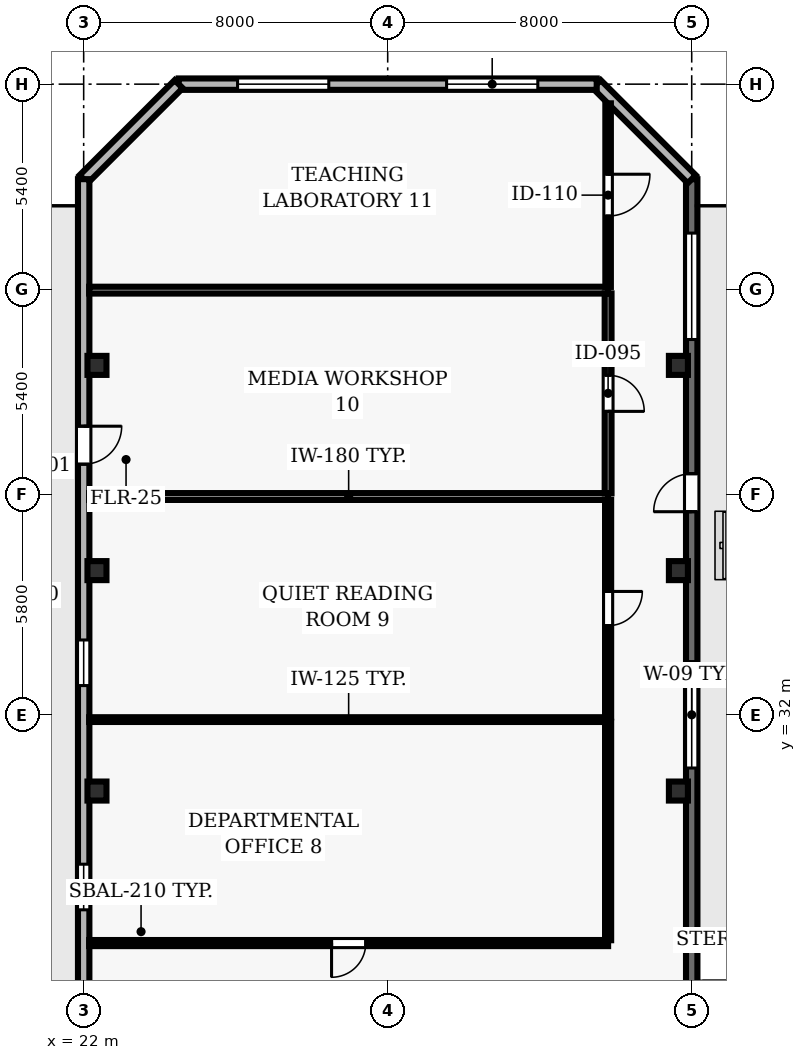
"""IFC4 building model, lengths in metres.
Left out: names, types, materials, properties, quantities, classifications, styles, units other than length and angle.
Written with IfcOpenShell. Run it as: python <this file> out.ifc"""

import sys

from ifc_helpers import new_model, si_unit, direction, frame, frame_2d, origin, origin_2d, place, context, subcontext, project, spatial, rectangle, hollow_rectangle, extrude, element, fill, save


model = new_model("IFC4")
c1 = context("Model", 3, precision=1e-05, world=origin(), true_north=direction((0.0, 1.0)))
c2 = subcontext(c1, "Body", "Model", "MODEL_VIEW")
j1 = project(units=[si_unit("LENGTHUNIT", "METRE"), si_unit("PLANEANGLEUNIT", "RADIAN")], contexts=[c1])
p1 = place(None, origin())
s1 = spatial("IfcSite", under=j1, at=p1, CompositionType="ELEMENT")
p2 = place(p1, origin())
s2 = spatial("IfcBuilding", under=s1, at=p2, CompositionType="ELEMENT")
p3 = place(p2, frame((0.0, 0.0, 150.2)))
s3 = spatial("IfcBuildingStorey", under=s2, at=p3, CompositionType="ELEMENT", Elevation=150.2)
for number, where, z_axis, x_axis in (
    (1, (22.35, 30.0, 0.0), (0.0, 0.0, 1.0), (1.0, 0.0, 0.0)),
    (2, (37.65, 30.0, 0.0), (0.0, 0.0, 1.0), (1.0, 0.0, 0.0)),
    (3, (22.35, 35.8, 0.0), (0.0, 0.0, 1.0), (1.0, 0.0, 0.0)),
    (4, (37.65, 35.8, 0.0), (0.0, 0.0, 1.0), (1.0, 0.0, 0.0)),
    (5, (22.35, 41.2, 0.0), (0.0, 0.0, 1.0), (1.0, 0.0, 0.0)),
    (6, (37.65, 41.2, 0.0), (0.0, 0.0, 1.0), (1.0, 0.0, 0.0)),
):
    element("IfcColumn", number, at=place(p3, frame(where, z_axis=z_axis, x_axis=x_axis)), inside=s3, PredefinedType="COLUMN", context=c2, shape_type="SweptSolid", body=[
        extrude(hollow_rectangle(XDim=0.5, YDim=0.5, WallThickness=0.025, at=origin_2d()), origin(), (0.0, 0.0, 1.0), 3.9),
    ])
p4 = place(p3, frame((38.0, 23.55, 0.0), z_axis=(0.0, 0.0, 1.0), x_axis=(0.0, 1.0, 0.0)))
e7 = element("IfcWall", 7, at=p4, inside=s3, PredefinedType="SOLIDWALL", context=c2, shape_type="SweptSolid", body=[
    extrude(rectangle(XDim=22.55, YDim=0.3, at=frame_2d((11.275, 0.0))), origin(), (0.0, 0.0, 1.0), 3.69),
])
p5 = place(p4, frame((13.8, 0.0, 0.0)))
e8 = element("IfcOpeningElement", 8, at=p5, cuts=e7, PredefinedType="OPENING", context=c2, shape_type="SweptSolid", body=[
    extrude(rectangle(XDim=1.0, YDim=2.2, at=frame_2d((0.5, 1.1))), frame((0.0, 0.16, 0.0), z_axis=(0.0, -1.0, 0.0), x_axis=(1.0, 0.0, 0.0)), (0.0, 0.0, 1.0), 0.32),
])
p6 = place(p4, frame((7.056, 0.0, 0.9)))
e9 = element("IfcOpeningElement", 9, at=p6, cuts=e7, PredefinedType="OPENING", context=c2, shape_type="SweptSolid", body=[
    extrude(rectangle(XDim=2.8, YDim=1.8, at=frame_2d((1.4, 0.9))), frame((0.0, 0.16, 0.0), z_axis=(0.0, -1.0, 0.0), x_axis=(1.0, 0.0, 0.0)), (0.0, 0.0, 1.0), 0.32),
])
p7 = place(p4, frame((18.331, 0.0, 0.9)))
e10 = element("IfcOpeningElement", 10, at=p7, cuts=e7, PredefinedType="OPENING", context=c2, shape_type="SweptSolid", body=[
    extrude(rectangle(XDim=2.8, YDim=1.8, at=frame_2d((1.4, 0.9))), frame((0.0, 0.16, 0.0), z_axis=(0.0, -1.0, 0.0), x_axis=(1.0, 0.0, 0.0)), (0.0, 0.0, 1.0), 0.32),
])
p8 = place(p3, frame((38.0, 46.1, 0.0), z_axis=(0.0, 0.0, 1.0), x_axis=(-0.707106781187, 0.707106781187, 0.0)))
e11 = element("IfcWall", 11, at=p8, inside=s3, PredefinedType="SOLIDWALL", context=c2, shape_type="SweptSolid", body=[
    extrude(rectangle(XDim=3.536, YDim=0.3, at=frame_2d((1.768, 0.0))), origin(), (0.0, 0.0, 1.0), 3.69),
])
p9 = place(p3, frame((35.5, 48.6, 0.0), z_axis=(0.0, 0.0, 1.0), x_axis=(-1.0, 0.0, 0.0)))
e12 = element("IfcWall", 12, at=p9, inside=s3, PredefinedType="SOLIDWALL", context=c2, shape_type="SweptSolid", body=[
    extrude(rectangle(XDim=11.0, YDim=0.3, at=frame_2d((5.5, 0.0))), origin(), (0.0, 0.0, 1.0), 3.69),
])
p10 = place(p9, frame((1.55, 0.0, 0.9)))
e13 = element("IfcOpeningElement", 13, at=p10, cuts=e12, PredefinedType="OPENING", context=c2, shape_type="SweptSolid", body=[
    extrude(rectangle(XDim=2.4, YDim=2.2, at=frame_2d((1.2, 1.1))), frame((0.0, 0.16, 0.0), z_axis=(0.0, -1.0, 0.0), x_axis=(1.0, 0.0, 0.0)), (0.0, 0.0, 1.0), 0.32),
])
p11 = place(p9, frame((7.05, 0.0, 0.9)))
e14 = element("IfcOpeningElement", 14, at=p11, cuts=e12, PredefinedType="OPENING", context=c2, shape_type="SweptSolid", body=[
    extrude(rectangle(XDim=2.4, YDim=2.2, at=frame_2d((1.2, 1.1))), frame((0.0, 0.16, 0.0), z_axis=(0.0, -1.0, 0.0), x_axis=(1.0, 0.0, 0.0)), (0.0, 0.0, 1.0), 0.32),
])
p12 = place(p3, frame((24.5, 48.6, 0.0), z_axis=(0.0, 0.0, 1.0), x_axis=(-0.707106781187, -0.707106781187, 0.0)))
e15 = element("IfcWall", 15, at=p12, inside=s3, PredefinedType="SOLIDWALL", context=c2, shape_type="SweptSolid", body=[
    extrude(rectangle(XDim=3.536, YDim=0.3, at=frame_2d((1.768, 0.0))), origin(), (0.0, 0.0, 1.0), 3.69),
])
p13 = place(p3, frame((22.0, 46.1, 0.0), z_axis=(0.0, 0.0, 1.0), x_axis=(0.0, -1.0, 0.0)))
e16 = element("IfcWall", 16, at=p13, inside=s3, PredefinedType="SOLIDWALL", context=c2, shape_type="SweptSolid", body=[
    extrude(rectangle(XDim=43.6, YDim=0.3, at=frame_2d((21.8, 0.0))), origin(), (0.0, 0.0, 1.0), 3.69),
])
p14 = place(p13, frame((6.5, 0.0, 0.0)))
e17 = element("IfcOpeningElement", 17, at=p14, cuts=e16, PredefinedType="OPENING", context=c2, shape_type="SweptSolid", body=[
    extrude(rectangle(XDim=1.0, YDim=2.2, at=frame_2d((0.5, 1.1))), frame((0.0, 0.16, 0.0), z_axis=(0.0, -1.0, 0.0), x_axis=(1.0, 0.0, 0.0)), (0.0, 0.0, 1.0), 0.32),
])
p15 = place(p13, frame((12.125, 0.0, 0.9)))
e18 = element("IfcOpeningElement", 18, at=p15, cuts=e16, PredefinedType="OPENING", context=c2, shape_type="SweptSolid", body=[
    extrude(rectangle(XDim=1.2, YDim=1.6, at=frame_2d((0.6, 0.8))), frame((0.0, 0.16, 0.0), z_axis=(0.0, -1.0, 0.0), x_axis=(1.0, 0.0, 0.0)), (0.0, 0.0, 1.0), 0.32),
])
p16 = place(p13, frame((18.025, 0.0, 0.9)))
e19 = element("IfcOpeningElement", 19, at=p16, cuts=e16, PredefinedType="OPENING", context=c2, shape_type="SweptSolid", body=[
    extrude(rectangle(XDim=1.2, YDim=1.6, at=frame_2d((0.6, 0.8))), frame((0.0, 0.16, 0.0), z_axis=(0.0, -1.0, 0.0), x_axis=(1.0, 0.0, 0.0)), (0.0, 0.0, 1.0), 0.32),
])
p17 = place(p13, frame((23.925, 0.0, 0.9)))
e20 = element("IfcOpeningElement", 20, at=p17, cuts=e16, PredefinedType="OPENING", context=c2, shape_type="SweptSolid", body=[
    extrude(rectangle(XDim=1.2, YDim=1.6, at=frame_2d((0.6, 0.8))), frame((0.0, 0.16, 0.0), z_axis=(0.0, -1.0, 0.0), x_axis=(1.0, 0.0, 0.0)), (0.0, 0.0, 1.0), 0.32),
])
p18 = place(p13, frame((29.375, 0.0, 0.9)))
e21 = element("IfcOpeningElement", 21, at=p18, cuts=e16, PredefinedType="OPENING", context=c2, shape_type="SweptSolid", body=[
    extrude(rectangle(XDim=1.2, YDim=1.6, at=frame_2d((0.6, 0.8))), frame((0.0, 0.16, 0.0), z_axis=(0.0, -1.0, 0.0), x_axis=(1.0, 0.0, 0.0)), (0.0, 0.0, 1.0), 0.32),
])
p19 = place(p13, frame((34.825, 0.0, 0.9)))
e22 = element("IfcOpeningElement", 22, at=p19, cuts=e16, PredefinedType="OPENING", context=c2, shape_type="SweptSolid", body=[
    extrude(rectangle(XDim=1.2, YDim=1.6, at=frame_2d((0.6, 0.8))), frame((0.0, 0.16, 0.0), z_axis=(0.0, -1.0, 0.0), x_axis=(1.0, 0.0, 0.0)), (0.0, 0.0, 1.0), 0.32),
])
p20 = place(p3, frame((35.8, 26.0, 0.0), z_axis=(0.0, 0.0, 1.0), x_axis=(-1.0, 0.0, 0.0)))
e23 = element("IfcWall", 23, at=p20, inside=s3, PredefinedType="PARTITIONING", context=c2, shape_type="SweptSolid", body=[
    extrude(rectangle(XDim=13.655, YDim=0.16, at=frame_2d((6.828, 0.0))), origin(), (0.0, 0.0, 1.0), 3.69),
])
p21 = place(p20, frame((6.377, 0.0, 0.0)))
e24 = element("IfcOpeningElement", 24, at=p21, cuts=e23, PredefinedType="OPENING", context=c2, shape_type="SweptSolid", body=[
    extrude(rectangle(XDim=0.9, YDim=2.1, at=frame_2d((0.45, 1.05))), frame((0.0, 0.09, 0.0), z_axis=(0.0, -1.0, 0.0), x_axis=(1.0, 0.0, 0.0)), (0.0, 0.0, 1.0), 0.18),
])
p22 = place(p3, frame((35.8, 31.88, 0.0), z_axis=(0.0, 0.0, 1.0), x_axis=(-1.0, 0.0, 0.0)))
e25 = element("IfcWall", 25, at=p22, inside=s3, PredefinedType="PARTITIONING", context=c2, shape_type="SweptSolid", body=[
    extrude(rectangle(XDim=13.655, YDim=0.125, at=frame_2d((6.828, 0.0))), origin(), (0.0, 0.0, 1.0), 3.69),
])
for number, where, z_axis, x_axis in (
    (26, (35.8, 37.75, 0.0), (0.0, 0.0, 1.0), (-1.0, 0.0, 0.0)),
    (27, (35.8, 43.18, 0.0), (0.0, 0.0, 1.0), (-1.0, 0.0, 0.0)),
):
    element("IfcWall", number, at=place(p3, frame(where, z_axis=z_axis, x_axis=x_axis)), inside=s3, PredefinedType="PARTITIONING", context=c2, shape_type="SweptSolid", body=[
        extrude(rectangle(XDim=13.655, YDim=0.18, at=frame_2d((6.828, 0.0))), origin(), (0.0, 0.0, 1.0), 3.69),
    ])
p23 = place(p3, frame((35.8, 31.822, 0.0), z_axis=(0.0, 0.0, 1.0), x_axis=(0.0, -1.0, 0.0)))
e28 = element("IfcWall", 28, at=p23, inside=s3, PredefinedType="PARTITIONING", context=c2, shape_type="SweptSolid", body=[
    extrude(rectangle(XDim=5.747, YDim=0.16, at=frame_2d((2.874, 0.0))), origin(), (0.0, 0.0, 1.0), 3.69),
])
p24 = place(p3, frame((35.8, 37.665, 0.0), z_axis=(0.0, 0.0, 1.0), x_axis=(0.0, -1.0, 0.0)))
e29 = element("IfcWall", 29, at=p24, inside=s3, PredefinedType="PARTITIONING", context=c2, shape_type="SweptSolid", body=[
    extrude(rectangle(XDim=5.727, YDim=0.16, at=frame_2d((2.864, 0.0))), origin(), (0.0, 0.0, 1.0), 3.69),
])
p25 = place(p24, frame((2.413, 0.0, 0.0)))
e30 = element("IfcOpeningElement", 30, at=p25, cuts=e29, PredefinedType="OPENING", context=c2, shape_type="SweptSolid", body=[
    extrude(rectangle(XDim=0.9, YDim=2.1, at=frame_2d((0.45, 1.05))), frame((0.0, 0.09, 0.0), z_axis=(0.0, -1.0, 0.0), x_axis=(1.0, 0.0, 0.0)), (0.0, 0.0, 1.0), 0.18),
])
p26 = place(p3, frame((35.8, 43.095, 0.0), z_axis=(0.0, 0.0, 1.0), x_axis=(0.0, -1.0, 0.0)))
e31 = element("IfcWall", 31, at=p26, inside=s3, PredefinedType="PARTITIONING", context=c2, shape_type="SweptSolid", body=[
    extrude(rectangle(XDim=5.26, YDim=0.18, at=frame_2d((2.63, 0.0))), origin(), (0.0, 0.0, 1.0), 3.69),
])
p27 = place(p26, frame((2.155, 0.0, 0.0)))
e32 = element("IfcOpeningElement", 32, at=p27, cuts=e31, PredefinedType="OPENING", context=c2, shape_type="SweptSolid", body=[
    extrude(rectangle(XDim=0.95, YDim=2.1, at=frame_2d((0.475, 1.05))), frame((0.0, 0.1, 0.0), z_axis=(0.0, -1.0, 0.0), x_axis=(1.0, 0.0, 0.0)), (0.0, 0.0, 1.0), 0.2),
])
p28 = place(p3, frame((35.8, 48.095, 0.0), z_axis=(0.0, 0.0, 1.0), x_axis=(0.0, -1.0, 0.0)))
e33 = element("IfcWall", 33, at=p28, inside=s3, PredefinedType="PARTITIONING", context=c2, shape_type="SweptSolid", body=[
    extrude(rectangle(XDim=4.83, YDim=0.145, at=frame_2d((2.415, 0.0))), origin(), (0.0, 0.0, 1.0), 3.69),
])
p29 = place(p28, frame((1.865, 0.0, 0.0)))
e34 = element("IfcOpeningElement", 34, at=p29, cuts=e33, PredefinedType="OPENING", context=c2, shape_type="SweptSolid", body=[
    extrude(rectangle(XDim=1.1, YDim=2.15, at=frame_2d((0.55, 1.075))), frame((0.0, 0.083, 0.0), z_axis=(0.0, -1.0, 0.0), x_axis=(1.0, 0.0, 0.0)), (0.0, 0.0, 1.0), 0.165),
])
p30 = place(p5, origin())
e35 = element("IfcDoor", 35, at=p30, inside=s3, OperationType="SINGLE_SWING_LEFT", PredefinedType="DOOR", context=c2, shape_type="SweptSolid", body=[
    extrude(rectangle(XDim=1.0, YDim=2.2, at=frame_2d((0.5, 1.1))), frame((0.0, 0.025, 0.0), z_axis=(0.0, -1.0, 0.0), x_axis=(1.0, 0.0, 0.0)), (0.0, 0.0, 1.0), 0.05),
])
fill(e8, e35)
p31 = place(p6, origin())
e36 = element("IfcWindow", 36, at=p31, inside=s3, PartitioningType="SINGLE_PANEL", PredefinedType="WINDOW", context=c2, shape_type="SweptSolid", body=[
    extrude(rectangle(XDim=2.8, YDim=1.8, at=frame_2d((1.4, 0.9))), frame((0.0, 0.03, 0.0), z_axis=(0.0, -1.0, 0.0), x_axis=(1.0, 0.0, 0.0)), (0.0, 0.0, 1.0), 0.06),
])
fill(e9, e36)
p32 = place(p7, origin())
e37 = element("IfcWindow", 37, at=p32, inside=s3, PartitioningType="SINGLE_PANEL", PredefinedType="WINDOW", context=c2, shape_type="SweptSolid", body=[
    extrude(rectangle(XDim=2.8, YDim=1.8, at=frame_2d((1.4, 0.9))), frame((0.0, 0.03, 0.0), z_axis=(0.0, -1.0, 0.0), x_axis=(1.0, 0.0, 0.0)), (0.0, 0.0, 1.0), 0.06),
])
fill(e10, e37)
p33 = place(p10, origin())
e38 = element("IfcWindow", 38, at=p33, inside=s3, PartitioningType="SINGLE_PANEL", PredefinedType="WINDOW", context=c2, shape_type="SweptSolid", body=[
    extrude(rectangle(XDim=2.4, YDim=2.2, at=frame_2d((1.2, 1.1))), frame((0.0, 0.03, 0.0), z_axis=(0.0, -1.0, 0.0), x_axis=(1.0, 0.0, 0.0)), (0.0, 0.0, 1.0), 0.06),
])
fill(e13, e38)
p34 = place(p11, origin())
e39 = element("IfcWindow", 39, at=p34, inside=s3, PartitioningType="SINGLE_PANEL", PredefinedType="WINDOW", context=c2, shape_type="SweptSolid", body=[
    extrude(rectangle(XDim=2.4, YDim=2.2, at=frame_2d((1.2, 1.1))), frame((0.0, 0.03, 0.0), z_axis=(0.0, -1.0, 0.0), x_axis=(1.0, 0.0, 0.0)), (0.0, 0.0, 1.0), 0.06),
])
fill(e14, e39)
p35 = place(p14, origin())
e40 = element("IfcDoor", 40, at=p35, inside=s3, OperationType="SINGLE_SWING_LEFT", PredefinedType="DOOR", context=c2, shape_type="SweptSolid", body=[
    extrude(rectangle(XDim=1.0, YDim=2.2, at=frame_2d((0.5, 1.1))), frame((0.0, 0.025, 0.0), z_axis=(0.0, -1.0, 0.0), x_axis=(1.0, 0.0, 0.0)), (0.0, 0.0, 1.0), 0.05),
])
fill(e17, e40)
p36 = place(p15, origin())
e41 = element("IfcWindow", 41, at=p36, inside=s3, PartitioningType="SINGLE_PANEL", PredefinedType="WINDOW", context=c2, shape_type="SweptSolid", body=[
    extrude(rectangle(XDim=1.2, YDim=1.6, at=frame_2d((0.6, 0.8))), frame((0.0, 0.03, 0.0), z_axis=(0.0, -1.0, 0.0), x_axis=(1.0, 0.0, 0.0)), (0.0, 0.0, 1.0), 0.06),
])
fill(e18, e41)
p37 = place(p16, origin())
e42 = element("IfcWindow", 42, at=p37, inside=s3, PartitioningType="SINGLE_PANEL", PredefinedType="WINDOW", context=c2, shape_type="SweptSolid", body=[
    extrude(rectangle(XDim=1.2, YDim=1.6, at=frame_2d((0.6, 0.8))), frame((0.0, 0.03, 0.0), z_axis=(0.0, -1.0, 0.0), x_axis=(1.0, 0.0, 0.0)), (0.0, 0.0, 1.0), 0.06),
])
fill(e19, e42)
p38 = place(p21, origin())
e43 = element("IfcDoor", 43, at=p38, inside=s3, OperationType="SINGLE_SWING_RIGHT", PredefinedType="DOOR", context=c2, shape_type="SweptSolid", body=[
    extrude(rectangle(XDim=0.9, YDim=2.1, at=frame_2d((0.45, 1.05))), frame((0.0, 0.025, 0.0), z_axis=(0.0, -1.0, 0.0), x_axis=(1.0, 0.0, 0.0)), (0.0, 0.0, 1.0), 0.05),
])
fill(e24, e43)
p39 = place(p25, origin())
e44 = element("IfcDoor", 44, at=p39, inside=s3, OperationType="SINGLE_SWING_LEFT", PredefinedType="DOOR", context=c2, shape_type="SweptSolid", body=[
    extrude(rectangle(XDim=0.9, YDim=2.1, at=frame_2d((0.45, 1.05))), frame((0.0, 0.025, 0.0), z_axis=(0.0, -1.0, 0.0), x_axis=(1.0, 0.0, 0.0)), (0.0, 0.0, 1.0), 0.05),
])
fill(e30, e44)
p40 = place(p27, origin())
e45 = element("IfcDoor", 45, at=p40, inside=s3, OperationType="SINGLE_SWING_RIGHT", PredefinedType="DOOR", context=c2, shape_type="SweptSolid", body=[
    extrude(rectangle(XDim=0.95, YDim=2.1, at=frame_2d((0.475, 1.05))), frame((0.0, 0.025, 0.0), z_axis=(0.0, -1.0, 0.0), x_axis=(1.0, 0.0, 0.0)), (0.0, 0.0, 1.0), 0.05),
])
fill(e32, e45)
p41 = place(p29, origin())
e46 = element("IfcDoor", 46, at=p41, inside=s3, OperationType="SINGLE_SWING_LEFT", PredefinedType="DOOR", context=c2, shape_type="SweptSolid", body=[
    extrude(rectangle(XDim=1.1, YDim=2.15, at=frame_2d((0.55, 1.075))), frame((0.0, 0.025, 0.0), z_axis=(0.0, -1.0, 0.0), x_axis=(1.0, 0.0, 0.0)), (0.0, 0.0, 1.0), 0.05),
])
fill(e34, e46)
save(model, sys.argv[1])
